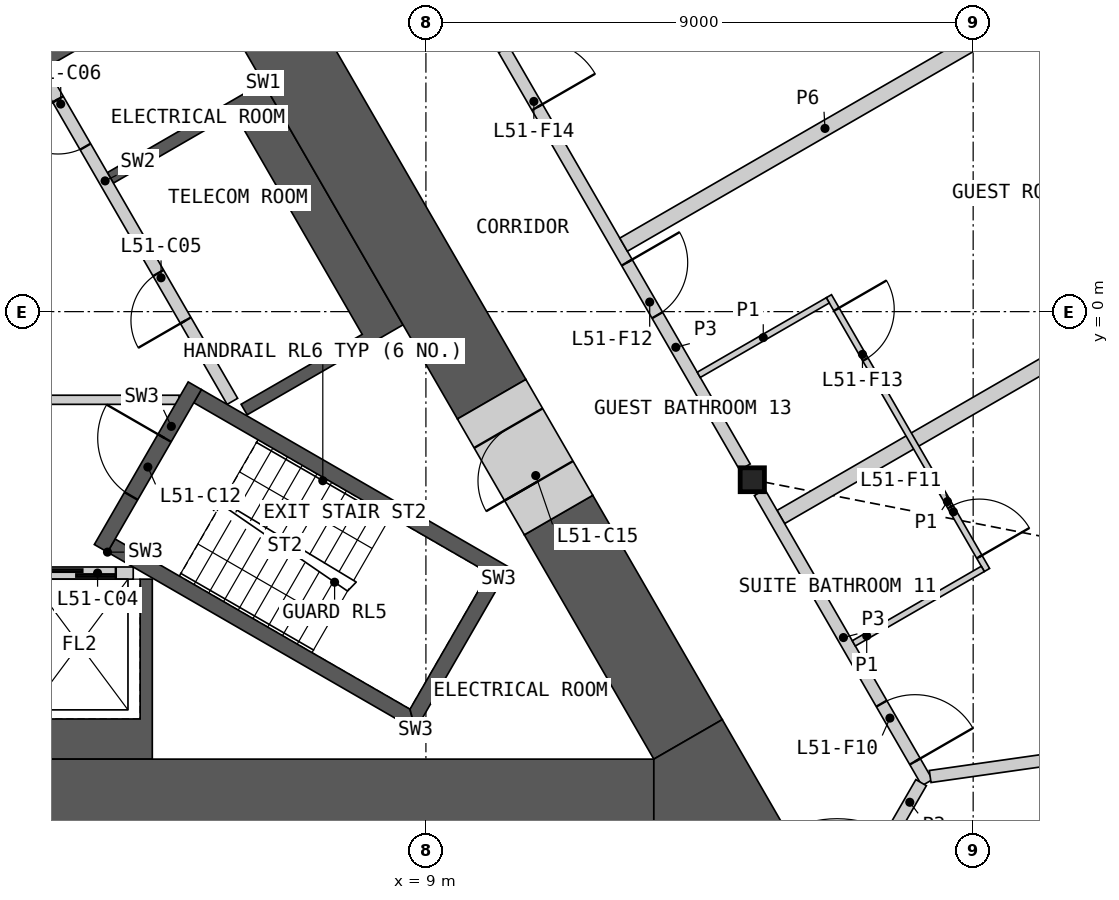
"""IFC4 building model, lengths in metres.
Left out: names, types, materials, properties, quantities, classifications, styles, units other than length and angle.
Written with IfcOpenShell. Run it as: python <this file> out.ifc"""

import sys

from ifc_helpers import new_model, si_unit, direction, frame, frame_2d, origin, origin_2d, place, context, subcontext, project, spatial, polyline, rectangle, i_section, outline, extrude, element, fill, save


model = new_model("IFC4")
c1 = context("Model", 3, precision=1e-05, world=origin(), true_north=direction((0.0, 1.0)))
c2 = subcontext(c1, "Body", "Model", "MODEL_VIEW")
j1 = project(units=[si_unit("LENGTHUNIT", "METRE"), si_unit("PLANEANGLEUNIT", "RADIAN")], contexts=[c1])
p1 = place(None, origin())
s1 = spatial("IfcSite", under=j1, at=p1, CompositionType="ELEMENT")
p2 = place(p1, origin())
s2 = spatial("IfcBuilding", under=s1, at=p2, CompositionType="ELEMENT")
p3 = place(p2, frame((0.0, 0.0, 234.6)))
s3 = spatial("IfcBuildingStorey", under=s2, at=p3, CompositionType="ELEMENT", Elevation=234.6)
p4 = place(p3, frame((14.368, -2.765, 0.0), z_axis=(0.0, 0.0, 1.0), x_axis=(1.0, 0.0, 0.0)))
e1 = element("IfcColumn", 1, at=p4, inside=s3, PredefinedType="COLUMN", context=c2, shape_type="SweptSolid", body=[
    extrude(i_section(OverallWidth=0.399, OverallDepth=0.393, WebThickness=0.023, FlangeThickness=0.037, at=origin_2d()), origin(), (0.0, 0.0, 1.0), 3.6),
])
p5 = place(p3, origin())
e2 = element("IfcWall", 2, at=p5, inside=s3, PredefinedType="SHEAR", context=c2, shape_type="SweptSolid", body=[
    extrude(outline(polyline([(2.1, -7.36), (2.1, -4.4), (2.3, -4.4), (2.3, -6.7), (4.3, -6.7), (4.3, -4.4), (4.5, -4.4), (4.5, -7.36), (2.1, -7.36)])), origin(), (0.0, 0.0, 1.0), 3.25),
])
p6 = place(p3, frame((-4.187, -4.3, 0.0), z_axis=(0.0, 0.0, 1.0), x_axis=(1.0, 0.0, 0.0)))
e3 = element("IfcWall", 3, at=p6, inside=s3, PredefinedType="SOLIDWALL", context=c2, shape_type="SweptSolid", body=[
    extrude(rectangle(XDim=8.373, YDim=0.2, at=frame_2d((4.187, 0.0))), origin(), (0.0, 0.0, 1.0), 3.25),
])
p7 = place(p6, frame((0.287, 0.0, 0.0)))
e4 = element("IfcOpeningElement", 4, at=p7, cuts=e3, PredefinedType="OPENING", context=c2, shape_type="SweptSolid", body=[
    extrude(rectangle(XDim=1.2, YDim=2.1, at=frame_2d((0.6, 1.05))), frame((0.0, 0.11, 0.0), z_axis=(0.0, -1.0, 0.0), x_axis=(1.0, 0.0, 0.0)), (0.0, 0.0, 1.0), 0.22),
])
p8 = place(p6, frame((2.387, 0.0, 0.0)))
e5 = element("IfcOpeningElement", 5, at=p8, cuts=e3, PredefinedType="OPENING", context=c2, shape_type="SweptSolid", body=[
    extrude(rectangle(XDim=1.4, YDim=2.1, at=frame_2d((0.7, 1.05))), frame((0.0, 0.11, 0.0), z_axis=(0.0, -1.0, 0.0), x_axis=(1.0, 0.0, 0.0)), (0.0, 0.0, 1.0), 0.22),
])
p9 = place(p6, frame((4.837, 0.0, 0.0)))
e6 = element("IfcOpeningElement", 6, at=p9, cuts=e3, PredefinedType="OPENING", context=c2, shape_type="SweptSolid", body=[
    extrude(rectangle(XDim=0.9, YDim=2.1, at=frame_2d((0.45, 1.05))), frame((0.0, 0.11, 0.0), z_axis=(0.0, -1.0, 0.0), x_axis=(1.0, 0.0, 0.0)), (0.0, 0.0, 1.0), 0.22),
])
p10 = place(p6, frame((6.887, 0.0, 0.0)))
e7 = element("IfcOpeningElement", 7, at=p10, cuts=e3, PredefinedType="OPENING", context=c2, shape_type="SweptSolid", body=[
    extrude(rectangle(XDim=1.2, YDim=2.1, at=frame_2d((0.6, 1.05))), frame((0.0, 0.11, 0.0), z_axis=(0.0, -1.0, 0.0), x_axis=(1.0, 0.0, 0.0)), (0.0, 0.0, 1.0), 0.22),
])
p11 = place(p3, origin())
e8 = element("IfcWall", 8, at=p11, inside=s3, PredefinedType="SHEAR", context=c2, shape_type="SweptSolid", body=[
    extrude(outline(polyline([(6.324, 3.767), (8.624, -0.217), (8.231, -0.444), (6.061, -1.697), (5.96, -1.524), (7.952, -0.374), (5.852, 3.263), (3.861, 2.113), (3.76, 2.287), (5.931, 3.54), (6.324, 3.767)])), origin(), (0.0, 0.0, 1.0), 3.25),
])
p12 = place(p3, origin())
e9 = element("IfcWall", 9, at=p12, inside=s3, PredefinedType="SHEAR", context=c2, shape_type="SweptSolid", body=[
    extrude(outline(polyline([(5.324, 5.499), (4.931, 5.272), (2.76, 4.019), (2.66, 4.192), (4.652, 5.342), (3.652, 7.074), (1.66, 5.924), (1.561, 6.097), (3.731, 7.35), (4.124, 7.577), (5.324, 5.499)])), origin(), (0.0, 0.0, 1.0), 3.25),
])
p13 = place(p3, frame((5.817, -1.476, 0.0), z_axis=(0.0, 0.0, 1.0), x_axis=(-0.500002616675, 0.866023893041, 0.0)))
e10 = element("IfcWall", 10, at=p13, inside=s3, PredefinedType="SOLIDWALL", context=c2, shape_type="SweptSolid", body=[
    extrude(rectangle(XDim=8.373, YDim=0.2, at=frame_2d((4.187, 0.0))), origin(), (0.0, 0.0, 1.0), 3.25),
])
p14 = place(p13, frame((1.537, 0.0, 0.0)))
e11 = element("IfcOpeningElement", 11, at=p14, cuts=e10, PredefinedType="OPENING", context=c2, shape_type="SweptSolid", body=[
    extrude(rectangle(XDim=0.9, YDim=2.1, at=frame_2d((0.45, 1.05))), frame((0.0, 0.11, 0.0), z_axis=(0.0, -1.0, 0.0), x_axis=(1.0, 0.0, 0.0)), (0.0, 0.0, 1.0), 0.22),
])
p15 = place(p13, frame((4.837, 0.0, 0.0)))
e12 = element("IfcOpeningElement", 12, at=p15, cuts=e10, PredefinedType="OPENING", context=c2, shape_type="SweptSolid", body=[
    extrude(rectangle(XDim=0.9, YDim=2.1, at=frame_2d((0.45, 1.05))), frame((0.0, 0.11, 0.0), z_axis=(0.0, -1.0, 0.0), x_axis=(1.0, 0.0, 0.0)), (0.0, 0.0, 1.0), 0.22),
])
p16 = place(p13, frame((6.937, 0.0, 0.0)))
e13 = element("IfcOpeningElement", 13, at=p16, cuts=e10, PredefinedType="OPENING", context=c2, shape_type="SweptSolid", body=[
    extrude(rectangle(XDim=1.1, YDim=2.1, at=frame_2d((0.55, 1.05))), frame((0.0, 0.11, 0.0), z_axis=(0.0, -1.0, 0.0), x_axis=(1.0, 0.0, 0.0)), (0.0, 0.0, 1.0), 0.22),
])
p17 = place(p3, frame((-4.941, -1.45, 0.0), z_axis=(0.0, 0.0, 1.0), x_axis=(1.0, 0.0, 0.0)))
e14 = element("IfcWall", 14, at=p17, inside=s3, PredefinedType="PARTITIONING", context=c2, shape_type="SweptSolid", body=[
    extrude(rectangle(XDim=9.882, YDim=0.15, at=frame_2d((4.941, 0.0))), origin(), (0.0, 0.0, 1.0), 3.25),
])
p18 = place(p17, frame((4.391, 0.0, 0.0)))
e15 = element("IfcOpeningElement", 15, at=p18, cuts=e14, PredefinedType="OPENING", context=c2, shape_type="SweptSolid", body=[
    extrude(rectangle(XDim=1.1, YDim=2.1, at=frame_2d((0.55, 1.05))), frame((0.0, 0.085, 0.0), z_axis=(0.0, -1.0, 0.0), x_axis=(1.0, 0.0, 0.0)), (0.0, 0.0, 1.0), 0.17),
])
p19 = place(p3, origin())
e16 = element("IfcWall", 16, at=p19, inside=s3, PredefinedType="SHEAR", context=c2, shape_type="SweptSolid", body=[
    extrude(outline(polyline([(3.763, -3.956), (8.83, -6.881), (8.738, -6.539), (3.888, -3.739), (3.763, -3.956)])), origin(), (0.0, 0.0, 1.0), 3.25),
])
p20 = place(p3, origin())
e17 = element("IfcWall", 17, at=p20, inside=s3, PredefinedType="SHEAR", context=c2, shape_type="SweptSolid", body=[
    extrude(outline(polyline([(8.83, -6.881), (10.374, -4.206), (10.032, -4.298), (8.738, -6.539), (8.83, -6.881)])), origin(), (0.0, 0.0, 1.0), 3.25),
])
p21 = place(p3, origin())
e18 = element("IfcWall", 18, at=p21, inside=s3, PredefinedType="SHEAR", context=c2, shape_type="SweptSolid", body=[
    extrude(outline(polyline([(10.032, -4.298), (10.374, -4.206), (5.307, -1.281), (5.182, -1.498), (10.032, -4.298)])), origin(), (0.0, 0.0, 1.0), 3.25),
])
p22 = place(p3, frame((3.655, -3.893, 0.0), z_axis=(0.0, 0.0, 1.0), x_axis=(0.499982516597, 0.866035497597, 0.0)))
e19 = element("IfcWall", 19, at=p22, inside=s3, PredefinedType="SHEAR", context=c2, shape_type="SweptSolid", body=[
    extrude(rectangle(XDim=3.088, YDim=0.25, at=frame_2d((1.544, 0.0))), origin(), (0.0, 0.0, 1.0), 3.25),
])
p23 = place(p22, frame((0.994, 0.0, 0.0)))
e20 = element("IfcOpeningElement", 20, at=p23, cuts=e19, PredefinedType="OPENING", context=c2, shape_type="SweptSolid", body=[
    extrude(rectangle(XDim=1.1, YDim=2.1, at=frame_2d((0.55, 1.05))), frame((0.0, 0.135, 0.0), z_axis=(0.0, -1.0, 0.0), x_axis=(1.0, 0.0, 0.0)), (0.0, 0.0, 1.0), 0.27),
])
p24 = place(p3, frame((-12.748, -8.01, 0.0), z_axis=(0.0, 0.0, 1.0), x_axis=(1.0, 0.0, 0.0)))
e21 = element("IfcWall", 21, at=p24, inside=s3, PredefinedType="SHEAR", context=c2, shape_type="SweptSolid", body=[
    extrude(rectangle(XDim=25.497, YDim=1.3, at=frame_2d((12.748, 0.0))), origin(), (0.0, 0.0, 1.0), 3.25),
])
p25 = place(p3, frame((10.081, -1.441, 0.0), z_axis=(0.0, 0.0, 1.0), x_axis=(-0.500012180433, 0.866018371294, 0.0)))
e22 = element("IfcWall", 22, at=p25, inside=s3, PredefinedType="SHEAR", context=c2, shape_type="SweptSolid", body=[
    extrude(rectangle(XDim=15.05, YDim=1.3, at=frame_2d((7.525, 0.0))), origin(), (0.0, 0.0, 1.0), 3.25),
])
p26 = place(p3, frame((13.311, -7.035, 0.0), z_axis=(0.0, 0.0, 1.0), x_axis=(-0.500003555838, 0.866023350811, 0.0)))
e23 = element("IfcWall", 23, at=p26, inside=s3, PredefinedType="SHEAR", context=c2, shape_type="SweptSolid", body=[
    extrude(rectangle(XDim=4.26, YDim=1.3, at=frame_2d((2.13, 0.0))), origin(), (0.0, 0.0, 1.0), 3.25),
])
p27 = place(p3, origin())
e24 = element("IfcWall", 24, at=p27, inside=s3, PredefinedType="SHEAR", context=c2, shape_type="SweptSolid", body=[
    extrude(outline(polyline([(12.748, -8.66), (12.748, -7.36), (13.874, -6.71), (15.0, -8.66), (12.748, -8.66)])), origin(), (0.0, 0.0, 1.0), 3.25),
])
p28 = place(p3, frame((11.181, -3.346, 0.0), z_axis=(0.0, 0.0, 1.0), x_axis=(-0.499946605688, 0.86605622881, 0.0)))
e25 = element("IfcWall", 25, at=p28, inside=s3, PredefinedType="SHEAR", context=c2, shape_type="SweptSolid", body=[
    extrude(rectangle(XDim=2.2, YDim=1.3, at=frame_2d((1.1, 0.0))), origin(), (0.0, 0.0, 1.0), 3.25),
])
p29 = place(p28, frame((0.65, 0.0, 0.0)))
e26 = element("IfcOpeningElement", 26, at=p29, cuts=e25, PredefinedType="OPENING", context=c2, shape_type="SweptSolid", body=[
    extrude(rectangle(XDim=1.0, YDim=2.1, at=frame_2d((0.5, 1.05))), frame((0.0, 0.66, 0.0), z_axis=(0.0, -1.0, 0.0), x_axis=(1.0, 0.0, 0.0)), (0.0, 0.0, 1.0), 1.32),
])
p30 = place(p3, frame((14.837, -3.378, 0.0), z_axis=(0.0, 0.0, 1.0), x_axis=(0.866021706022, 0.500006404657, 0.0)))
e27 = element("IfcWall", 27, at=p30, inside=s3, PredefinedType="PARTITIONING", context=c2, shape_type="SweptSolid", body=[
    extrude(rectangle(XDim=12.33, YDim=0.25, at=frame_2d((6.165, 0.0))), origin(), (0.0, 0.0, 1.0), 2.404),
])
p31 = place(p3, frame((9.699, 5.321, 0.0), z_axis=(0.0, 0.0, 1.0), x_axis=(0.49998193945, -0.866035830797, 0.0)))
e28 = element("IfcWall", 28, at=p31, inside=s3, PredefinedType="PARTITIONING", context=c2, shape_type="SweptSolid", body=[
    extrude(rectangle(XDim=9.094, YDim=0.2, at=frame_2d((4.547, 0.0))), origin(), (0.0, 0.0, 1.0), 3.25),
])
p32 = place(p31, frame((5.212, 0.0, 0.0)))
e29 = element("IfcOpeningElement", 29, at=p32, cuts=e28, PredefinedType="OPENING", context=c2, shape_type="SweptSolid", body=[
    extrude(rectangle(XDim=1.0, YDim=2.1, at=frame_2d((0.5, 1.05))), frame((0.0, 0.11, 0.0), z_axis=(0.0, -1.0, 0.0), x_axis=(1.0, 0.0, 0.0)), (0.0, 0.0, 1.0), 0.22),
])
p33 = place(p31, frame((1.162, 0.0, 0.0)))
e30 = element("IfcOpeningElement", 30, at=p33, cuts=e28, PredefinedType="OPENING", context=c2, shape_type="SweptSolid", body=[
    extrude(rectangle(XDim=1.1, YDim=2.1, at=frame_2d((0.55, 1.05))), frame((0.0, 0.11, 0.0), z_axis=(0.0, -1.0, 0.0), x_axis=(1.0, 0.0, 0.0)), (0.0, 0.0, 1.0), 0.22),
])
p34 = place(p3, frame((12.251, 1.101, 0.0), z_axis=(0.0, 0.0, 1.0), x_axis=(0.866020808234, 0.500007959642, 0.0)))
e31 = element("IfcWall", 31, at=p34, inside=s3, PredefinedType="PARTITIONING", context=c2, shape_type="SweptSolid", body=[
    extrude(rectangle(XDim=7.649, YDim=0.25, at=frame_2d((3.824, 0.0))), origin(), (0.0, 0.0, 1.0), 2.404),
])
p35 = place(p3, frame((14.489, -2.975, 0.0), z_axis=(0.0, 0.0, 1.0), x_axis=(0.500017753321, -0.866015153657, 0.0)))
e32 = element("IfcWall", 32, at=p35, inside=s3, PredefinedType="PARTITIONING", context=c2, shape_type="SweptSolid", body=[
    extrude(rectangle(XDim=5.51, YDim=0.2, at=frame_2d((2.755, 0.0))), origin(), (0.0, 0.0, 1.0), 3.25),
])
p36 = place(p35, frame((4.01, 0.0, 0.0)))
e33 = element("IfcOpeningElement", 33, at=p36, cuts=e32, PredefinedType="OPENING", context=c2, shape_type="SweptSolid", body=[
    extrude(rectangle(XDim=1.1, YDim=2.1, at=frame_2d((0.55, 1.05))), frame((0.0, 0.11, 0.0), z_axis=(0.0, -1.0, 0.0), x_axis=(1.0, 0.0, 0.0)), (0.0, 0.0, 1.0), 0.22),
])
p37 = place(p3, frame((15.281, -10.974, 0.0), z_axis=(0.0, 0.0, 1.0), x_axis=(0.499958791762, 0.866049194065, 0.0)))
e34 = element("IfcWall", 34, at=p37, inside=s3, PredefinedType="PARTITIONING", context=c2, shape_type="SweptSolid", body=[
    extrude(rectangle(XDim=3.726, YDim=0.2, at=frame_2d((1.863, 0.0))), origin(), (0.0, 0.0, 1.0), 3.25),
])
p38 = place(p37, frame((0.963, 0.0, 0.0)))
e35 = element("IfcOpeningElement", 35, at=p38, cuts=e34, PredefinedType="OPENING", context=c2, shape_type="SweptSolid", body=[
    extrude(rectangle(XDim=1.8, YDim=2.1, at=frame_2d((0.9, 1.05))), frame((0.0, 0.11, 0.0), z_axis=(0.0, -1.0, 0.0), x_axis=(1.0, 0.0, 0.0)), (0.0, 0.0, 1.0), 0.22),
])
p39 = place(p3, frame((17.293, -7.646, 0.0), z_axis=(0.0, 0.0, 1.0), x_axis=(0.990042285303, 0.140770285614, 0.0)))
e36 = element("IfcWall", 36, at=p39, inside=s3, PredefinedType="PARTITIONING", context=c2, shape_type="SweptSolid", body=[
    extrude(rectangle(XDim=13.545, YDim=0.2, at=frame_2d((6.772, 0.0))), origin(), (0.0, 0.0, 1.0), 2.404),
])
p40 = place(p3, frame((15.627, 0.254, 0.0), z_axis=(0.0, 0.0, 1.0), x_axis=(0.500027264788, -0.866009661879, 0.0)))
e37 = element("IfcWall", 37, at=p40, inside=s3, PredefinedType="PARTITIONING", context=c2, shape_type="SweptSolid", body=[
    extrude(rectangle(XDim=5.2, YDim=0.1, at=frame_2d((2.6, 0.0))), origin(), (0.0, 0.0, 1.0), 2.404),
])
p41 = place(p40, frame((4.0, 0.0, 0.0)))
e38 = element("IfcOpeningElement", 38, at=p41, cuts=e37, PredefinedType="OPENING", context=c2, shape_type="SweptSolid", body=[
    extrude(rectangle(XDim=0.95, YDim=2.1, at=frame_2d((0.475, 1.05))), frame((0.0, 0.06, 0.0), z_axis=(0.0, -1.0, 0.0), x_axis=(1.0, 0.0, 0.0)), (0.0, 0.0, 1.0), 0.12),
])
p42 = place(p40, frame((0.25, 0.0, 0.0)))
e39 = element("IfcOpeningElement", 39, at=p42, cuts=e37, PredefinedType="OPENING", context=c2, shape_type="SweptSolid", body=[
    extrude(rectangle(XDim=0.95, YDim=2.1, at=frame_2d((0.475, 1.05))), frame((0.0, 0.06, 0.0), z_axis=(0.0, -1.0, 0.0), x_axis=(1.0, 0.0, 0.0)), (0.0, 0.0, 1.0), 0.12),
])
p43 = place(p3, frame((16.037, -5.456, 0.0), z_axis=(0.0, 0.0, 1.0), x_axis=(0.865989751695, 0.500061746146, 0.0)))
e40 = element("IfcWall", 40, at=p43, inside=s3, PredefinedType="PARTITIONING", context=c2, shape_type="SweptSolid", body=[
    extrude(rectangle(XDim=2.45, YDim=0.1, at=frame_2d((1.225, 0.0))), origin(), (0.0, 0.0, 1.0), 2.404),
])
p44 = place(p3, frame((13.487, -1.04, 0.0), z_axis=(0.0, 0.0, 1.0), x_axis=(0.866032905446, 0.499987006516, 0.0)))
e41 = element("IfcWall", 41, at=p44, inside=s3, PredefinedType="PARTITIONING", context=c2, shape_type="SweptSolid", body=[
    extrude(rectangle(XDim=2.45, YDim=0.1, at=frame_2d((1.225, 0.0))), origin(), (0.0, 0.0, 1.0), 2.404),
])
p45 = place(p10, origin())
e42 = element("IfcDoor", 42, at=p45, inside=s3, OperationType="SLIDING_TO_LEFT", PredefinedType="DOOR", context=c2, shape_type="SweptSolid", body=[
    extrude(rectangle(XDim=1.2, YDim=2.1, at=frame_2d((0.6, 1.05))), frame((0.0, 0.025, 0.0), z_axis=(0.0, -1.0, 0.0), x_axis=(1.0, 0.0, 0.0)), (0.0, 0.0, 1.0), 0.05),
])
fill(e7, e42)
p46 = place(p14, origin())
e43 = element("IfcDoor", 43, at=p46, inside=s3, OperationType="SINGLE_SWING_LEFT", PredefinedType="DOOR", context=c2, shape_type="SweptSolid", body=[
    extrude(rectangle(XDim=0.9, YDim=2.1, at=frame_2d((0.45, 1.05))), frame((0.0, 0.025, 0.0), z_axis=(0.0, -1.0, 0.0), x_axis=(1.0, 0.0, 0.0)), (0.0, 0.0, 1.0), 0.05),
])
fill(e11, e43)
p47 = place(p15, origin())
e44 = element("IfcDoor", 44, at=p47, inside=s3, OperationType="SINGLE_SWING_RIGHT", PredefinedType="DOOR", context=c2, shape_type="SweptSolid", body=[
    extrude(rectangle(XDim=0.9, YDim=2.1, at=frame_2d((0.45, 1.05))), frame((0.0, 0.025, 0.0), z_axis=(0.0, -1.0, 0.0), x_axis=(1.0, 0.0, 0.0)), (0.0, 0.0, 1.0), 0.05),
])
fill(e12, e44)
p48 = place(p23, origin())
e45 = element("IfcDoor", 45, at=p48, inside=s3, OperationType="SINGLE_SWING_RIGHT", PredefinedType="DOOR", context=c2, shape_type="SweptSolid", body=[
    extrude(rectangle(XDim=1.1, YDim=2.1, at=frame_2d((0.55, 1.05))), frame((0.0, 0.025, 0.0), z_axis=(0.0, -1.0, 0.0), x_axis=(1.0, 0.0, 0.0)), (0.0, 0.0, 1.0), 0.05),
])
fill(e20, e45)
p49 = place(p29, origin())
e46 = element("IfcDoor", 46, at=p49, inside=s3, OperationType="SINGLE_SWING_LEFT", PredefinedType="DOOR", context=c2, shape_type="SweptSolid", body=[
    extrude(rectangle(XDim=1.0, YDim=2.1, at=frame_2d((0.5, 1.05))), frame((0.0, 0.405, 0.0), z_axis=(0.0, -1.0, 0.0), x_axis=(1.0, 0.0, 0.0)), (0.0, 0.0, 1.0), 0.05),
])
fill(e26, e46)
p50 = place(p36, origin())
e47 = element("IfcDoor", 47, at=p50, inside=s3, OperationType="SINGLE_SWING_RIGHT", PredefinedType="DOOR", context=c2, shape_type="SweptSolid", body=[
    extrude(rectangle(XDim=1.1, YDim=2.1, at=frame_2d((0.55, 1.05))), frame((0.0, 0.025, 0.0), z_axis=(0.0, -1.0, 0.0), x_axis=(1.0, 0.0, 0.0)), (0.0, 0.0, 1.0), 0.05),
])
fill(e33, e47)
p51 = place(p41, origin())
e48 = element("IfcDoor", 48, at=p51, inside=s3, OperationType="SINGLE_SWING_RIGHT", PredefinedType="DOOR", context=c2, shape_type="SweptSolid", body=[
    extrude(rectangle(XDim=0.95, YDim=2.1, at=frame_2d((0.475, 1.05))), frame((0.0, 0.025, 0.0), z_axis=(0.0, -1.0, 0.0), x_axis=(1.0, 0.0, 0.0)), (0.0, 0.0, 1.0), 0.05),
])
fill(e38, e48)
p52 = place(p32, origin())
e49 = element("IfcDoor", 49, at=p52, inside=s3, OperationType="SINGLE_SWING_LEFT", PredefinedType="DOOR", context=c2, shape_type="SweptSolid", body=[
    extrude(rectangle(XDim=1.0, YDim=2.1, at=frame_2d((0.5, 1.05))), frame((0.0, 0.025, 0.0), z_axis=(0.0, -1.0, 0.0), x_axis=(1.0, 0.0, 0.0)), (0.0, 0.0, 1.0), 0.05),
])
fill(e29, e49)
p53 = place(p42, origin())
e50 = element("IfcDoor", 50, at=p53, inside=s3, OperationType="SINGLE_SWING_LEFT", PredefinedType="DOOR", context=c2, shape_type="SweptSolid", body=[
    extrude(rectangle(XDim=0.95, YDim=2.1, at=frame_2d((0.475, 1.05))), frame((0.0, 0.025, 0.0), z_axis=(0.0, -1.0, 0.0), x_axis=(1.0, 0.0, 0.0)), (0.0, 0.0, 1.0), 0.05),
])
fill(e39, e50)
p54 = place(p33, origin())
e51 = element("IfcDoor", 51, at=p54, inside=s3, OperationType="SINGLE_SWING_RIGHT", PredefinedType="DOOR", context=c2, shape_type="SweptSolid", body=[
    extrude(rectangle(XDim=1.1, YDim=2.1, at=frame_2d((0.55, 1.05))), frame((0.0, 0.025, 0.0), z_axis=(0.0, -1.0, 0.0), x_axis=(1.0, 0.0, 0.0)), (0.0, 0.0, 1.0), 0.05),
])
fill(e30, e51)
save(model, sys.argv[1])
